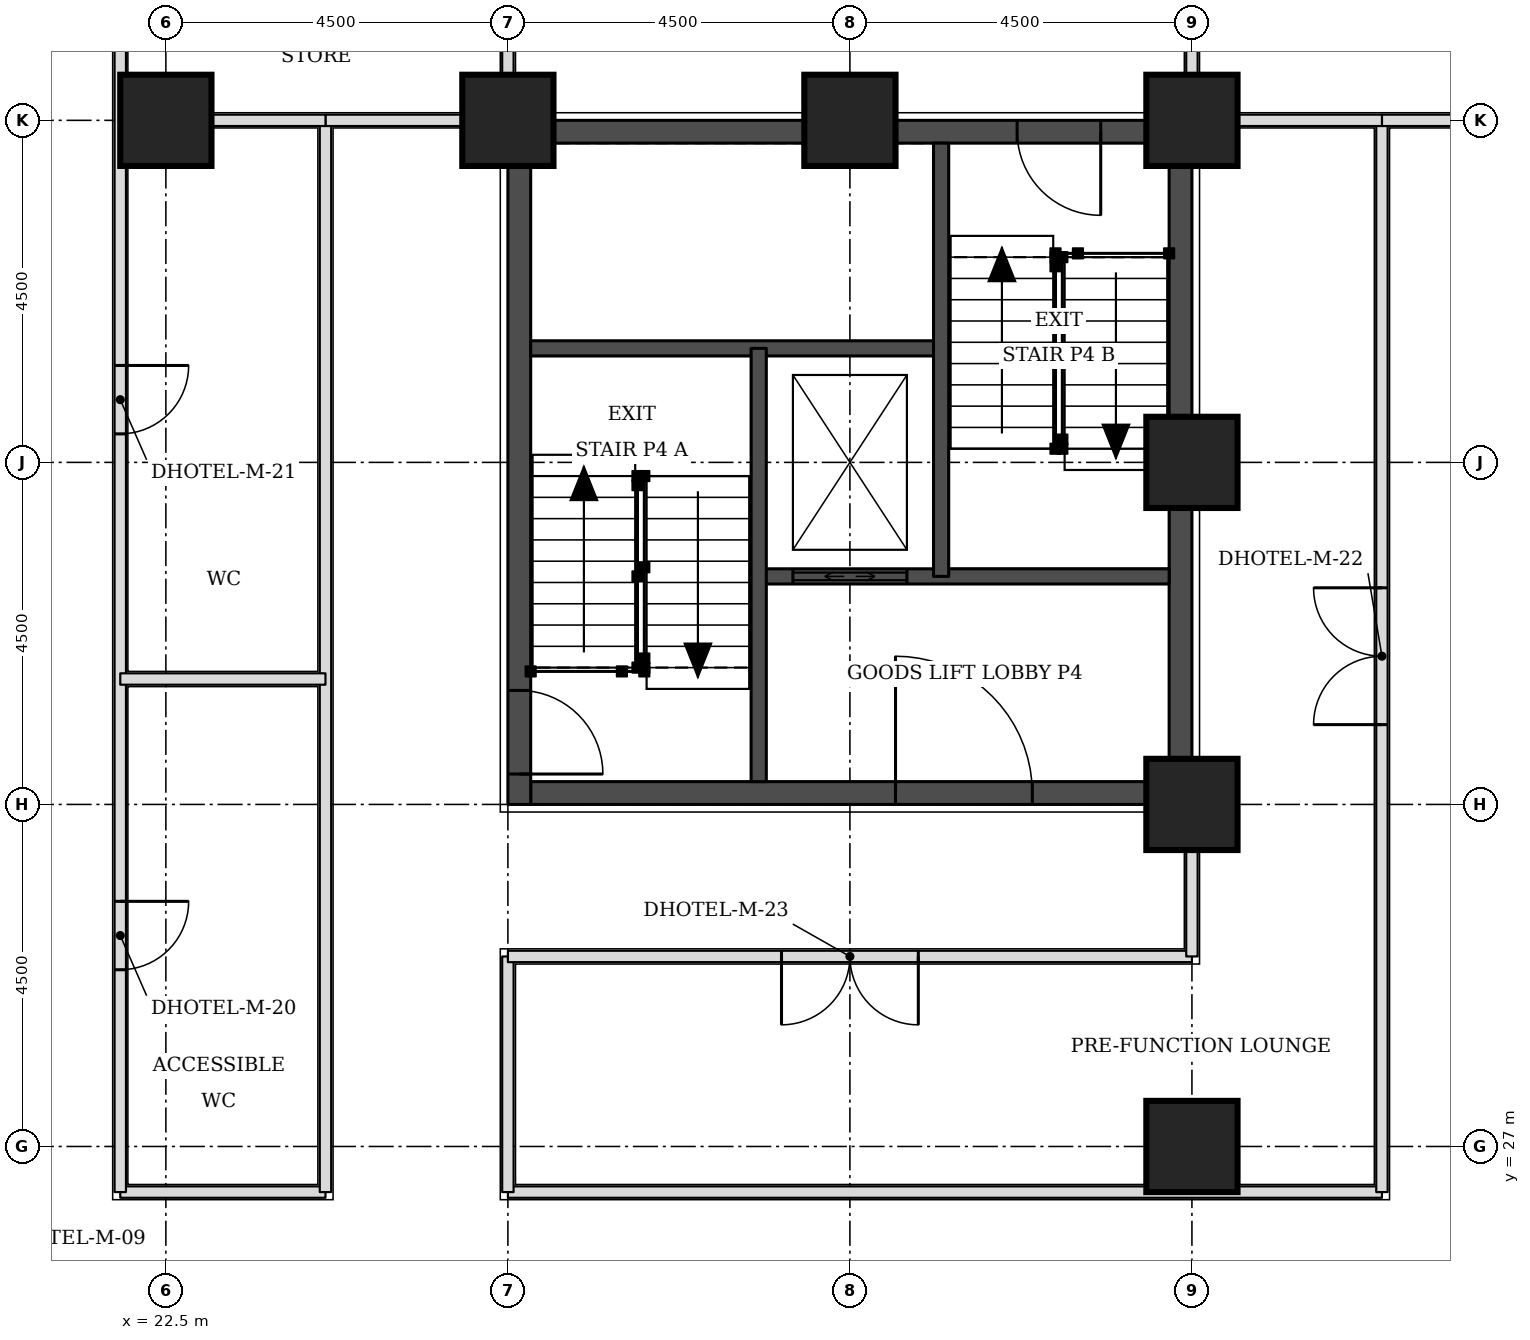
"""IFC4 building model, lengths in metres.
Left out: names, types, materials, properties, quantities, classifications, styles, units other than length and angle.
Written with IfcOpenShell. Run it as: python <this file> out.ifc"""

import sys

from ifc_helpers import new_model, si_unit, direction, frame, frame_2d, origin, origin_2d, place, context, subcontext, project, spatial, rectangle, extrude, element, fill, save


model = new_model("IFC4")
c1 = context("Model", 3, precision=1e-05, world=origin(), true_north=direction((0.0, 1.0)))
c2 = subcontext(c1, "Body", "Model", "MODEL_VIEW")
j1 = project(units=[si_unit("LENGTHUNIT", "METRE"), si_unit("PLANEANGLEUNIT", "RADIAN")], contexts=[c1])
p1 = place(None, origin())
s1 = spatial("IfcSite", under=j1, at=p1, CompositionType="ELEMENT")
p2 = place(p1, origin())
s2 = spatial("IfcBuilding", under=s1, at=p2, CompositionType="ELEMENT")
p3 = place(p2, frame((0.0, 0.0, 23.1)))
s3 = spatial("IfcBuildingStorey", under=s2, at=p3, CompositionType="ELEMENT", Elevation=23.1)
for number, where, z_axis, x_axis in (
    (1, (36.0, 27.0, 0.0), (0.0, 0.0, 1.0), (1.0, 0.0, 0.0)),
    (2, (36.0, 31.5, 0.0), (0.0, 0.0, 1.0), (1.0, 0.0, 0.0)),
    (3, (36.0, 36.0, 0.0), (0.0, 0.0, 1.0), (1.0, 0.0, 0.0)),
    (4, (22.5, 40.5, 0.0), (0.0, 0.0, 1.0), (1.0, 0.0, 0.0)),
    (5, (27.0, 40.5, 0.0), (0.0, 0.0, 1.0), (1.0, 0.0, 0.0)),
    (6, (31.5, 40.5, 0.0), (0.0, 0.0, 1.0), (1.0, 0.0, 0.0)),
    (7, (36.0, 40.5, 0.0), (0.0, 0.0, 1.0), (1.0, 0.0, 0.0)),
):
    element("IfcColumn", number, at=place(p3, frame(where, z_axis=z_axis, x_axis=x_axis)), inside=s3, PredefinedType="COLUMN", context=c2, shape_type="SweptSolid", body=[
        extrude(rectangle(XDim=1.2, YDim=1.2, at=origin_2d()), origin(), (0.0, 0.0, 1.0), 3.3),
    ])
p4 = place(p3, frame((27.3, 31.65, 0.0), z_axis=(0.0, 0.0, 1.0), x_axis=(1.0, 0.0, 0.0)))
e8 = element("IfcWall", 8, at=p4, inside=s3, PredefinedType="SHEAR", context=c2, shape_type="SweptSolid", body=[
    extrude(rectangle(XDim=8.4, YDim=0.3, at=frame_2d((4.2, 0.0))), origin(), (0.0, 0.0, 1.0), 3.3),
])
p5 = place(p4, frame((4.8, 0.0, 0.0)))
e9 = element("IfcOpeningElement", 9, at=p5, cuts=e8, PredefinedType="OPENING", context=c2, shape_type="SweptSolid", body=[
    extrude(rectangle(XDim=1.8, YDim=2.1, at=frame_2d((0.9, 1.05))), frame((0.0, 0.16, 0.0), z_axis=(0.0, -1.0, 0.0), x_axis=(1.0, 0.0, 0.0)), (0.0, 0.0, 1.0), 0.32),
])
p6 = place(p3, frame((27.3, 40.35, 0.0), z_axis=(0.0, 0.0, 1.0), x_axis=(1.0, 0.0, 0.0)))
e10 = element("IfcWall", 10, at=p6, inside=s3, PredefinedType="SHEAR", context=c2, shape_type="SweptSolid", body=[
    extrude(rectangle(XDim=8.4, YDim=0.3, at=frame_2d((4.2, 0.0))), origin(), (0.0, 0.0, 1.0), 3.3),
])
p7 = place(p6, frame((6.4, 0.0, 0.0)))
e11 = element("IfcOpeningElement", 11, at=p7, cuts=e10, PredefinedType="OPENING", context=c2, shape_type="SweptSolid", body=[
    extrude(rectangle(XDim=1.1, YDim=2.1, at=frame_2d((0.55, 1.05))), frame((0.0, 0.16, 0.0), z_axis=(0.0, -1.0, 0.0), x_axis=(1.0, 0.0, 0.0)), (0.0, 0.0, 1.0), 0.32),
])
p8 = place(p3, frame((27.15, 31.5, 0.0), z_axis=(0.0, 0.0, 1.0), x_axis=(0.0, 1.0, 0.0)))
e12 = element("IfcWall", 12, at=p8, inside=s3, PredefinedType="SHEAR", context=c2, shape_type="SweptSolid", body=[
    extrude(rectangle(XDim=9.0, YDim=0.3, at=frame_2d((4.5, 0.0))), origin(), (0.0, 0.0, 1.0), 3.3),
])
p9 = place(p8, frame((0.4, 0.0, 0.0)))
e13 = element("IfcOpeningElement", 13, at=p9, cuts=e12, PredefinedType="OPENING", context=c2, shape_type="SweptSolid", body=[
    extrude(rectangle(XDim=1.1, YDim=2.1, at=frame_2d((0.55, 1.05))), frame((0.0, 0.16, 0.0), z_axis=(0.0, -1.0, 0.0), x_axis=(1.0, 0.0, 0.0)), (0.0, 0.0, 1.0), 0.32),
])
p10 = place(p3, frame((35.85, 31.5, 0.0), z_axis=(0.0, 0.0, 1.0), x_axis=(0.0, 1.0, 0.0)))
e14 = element("IfcWall", 14, at=p10, inside=s3, PredefinedType="SHEAR", context=c2, shape_type="SweptSolid", body=[
    extrude(rectangle(XDim=9.0, YDim=0.3, at=frame_2d((4.5, 0.0))), origin(), (0.0, 0.0, 1.0), 3.3),
])
p11 = place(p3, frame((21.9, 26.4, 0.0), z_axis=(0.0, 0.0, 1.0), x_axis=(1.0, 0.0, 0.0)))
e15 = element("IfcWall", 15, at=p11, inside=s3, PredefinedType="PARTITIONING", context=c2, shape_type="SweptSolid", body=[
    extrude(rectangle(XDim=2.7, YDim=0.15, at=frame_2d((1.35, 0.0))), origin(), (0.0, 0.0, 1.0), 3.08),
])
p12 = place(p3, frame((21.9, 26.4, 0.0), z_axis=(0.0, 0.0, 1.0), x_axis=(0.0, 1.0, 0.0)))
e16 = element("IfcWall", 16, at=p12, inside=s3, PredefinedType="PARTITIONING", context=c2, shape_type="SweptSolid", body=[
    extrude(rectangle(XDim=16.6, YDim=0.15, at=frame_2d((8.3, 0.0))), origin(), (0.0, 0.0, 1.0), 3.08),
])
p13 = place(p12, frame((2.925, 0.0, 0.0)))
e17 = element("IfcOpeningElement", 17, at=p13, cuts=e16, PredefinedType="OPENING", context=c2, shape_type="SweptSolid", body=[
    extrude(rectangle(XDim=0.9, YDim=2.1, at=frame_2d((0.45, 1.05))), frame((0.0, 0.085, 0.0), z_axis=(0.0, -1.0, 0.0), x_axis=(1.0, 0.0, 0.0)), (0.0, 0.0, 1.0), 0.17),
])
p14 = place(p12, frame((9.975, 0.0, 0.0)))
e18 = element("IfcOpeningElement", 18, at=p14, cuts=e16, PredefinedType="OPENING", context=c2, shape_type="SweptSolid", body=[
    extrude(rectangle(XDim=0.9, YDim=2.1, at=frame_2d((0.45, 1.05))), frame((0.0, 0.085, 0.0), z_axis=(0.0, -1.0, 0.0), x_axis=(1.0, 0.0, 0.0)), (0.0, 0.0, 1.0), 0.17),
])
p15 = place(p3, frame((24.6, 26.4, 0.0), z_axis=(0.0, 0.0, 1.0), x_axis=(0.0, 1.0, 0.0)))
e19 = element("IfcWall", 19, at=p15, inside=s3, PredefinedType="PARTITIONING", context=c2, shape_type="SweptSolid", body=[
    extrude(rectangle(XDim=14.1, YDim=0.15, at=frame_2d((7.05, 0.0))), origin(), (0.0, 0.0, 1.0), 3.08),
])
p16 = place(p3, frame((27.0, 26.4, 0.0), z_axis=(0.0, 0.0, 1.0), x_axis=(1.0, 0.0, 0.0)))
e20 = element("IfcWall", 20, at=p16, inside=s3, PredefinedType="PARTITIONING", context=c2, shape_type="SweptSolid", body=[
    extrude(rectangle(XDim=11.5, YDim=0.15, at=frame_2d((5.75, 0.0))), origin(), (0.0, 0.0, 1.0), 3.08),
])
p17 = place(p3, frame((27.0, 26.4, 0.0), z_axis=(0.0, 0.0, 1.0), x_axis=(0.0, 1.0, 0.0)))
e21 = element("IfcWall", 21, at=p17, inside=s3, PredefinedType="PARTITIONING", context=c2, shape_type="SweptSolid", body=[
    extrude(rectangle(XDim=3.1, YDim=0.15, at=frame_2d((1.55, 0.0))), origin(), (0.0, 0.0, 1.0), 3.08),
])
p18 = place(p3, frame((38.5, 26.4, 0.0), z_axis=(0.0, 0.0, 1.0), x_axis=(0.0, 1.0, 0.0)))
e22 = element("IfcWall", 22, at=p18, inside=s3, PredefinedType="PARTITIONING", context=c2, shape_type="SweptSolid", body=[
    extrude(rectangle(XDim=14.1, YDim=0.15, at=frame_2d((7.05, 0.0))), origin(), (0.0, 0.0, 1.0), 3.08),
])
p19 = place(p18, frame((6.15, 0.0, 0.0)))
e23 = element("IfcOpeningElement", 23, at=p19, cuts=e22, PredefinedType="OPENING", context=c2, shape_type="SweptSolid", body=[
    extrude(rectangle(XDim=1.8, YDim=2.1, at=frame_2d((0.9, 1.05))), frame((0.0, 0.085, 0.0), z_axis=(0.0, -1.0, 0.0), x_axis=(1.0, 0.0, 0.0)), (0.0, 0.0, 1.0), 0.17),
])
p20 = place(p3, frame((27.0, 29.5, 0.0), z_axis=(0.0, 0.0, 1.0), x_axis=(1.0, 0.0, 0.0)))
e24 = element("IfcWall", 24, at=p20, inside=s3, PredefinedType="PARTITIONING", context=c2, shape_type="SweptSolid", body=[
    extrude(rectangle(XDim=9.0, YDim=0.15, at=frame_2d((4.5, 0.0))), origin(), (0.0, 0.0, 1.0), 3.08),
])
p21 = place(p20, frame((3.6, 0.0, 0.0)))
e25 = element("IfcOpeningElement", 25, at=p21, cuts=e24, PredefinedType="OPENING", context=c2, shape_type="SweptSolid", body=[
    extrude(rectangle(XDim=1.8, YDim=2.1, at=frame_2d((0.9, 1.05))), frame((0.0, 0.085, 0.0), z_axis=(0.0, -1.0, 0.0), x_axis=(1.0, 0.0, 0.0)), (0.0, 0.0, 1.0), 0.17),
])
p22 = place(p3, frame((36.0, 29.5, 0.0), z_axis=(0.0, 0.0, 1.0), x_axis=(0.0, 1.0, 0.0)))
e26 = element("IfcWall", 26, at=p22, inside=s3, PredefinedType="PARTITIONING", context=c2, shape_type="SweptSolid", body=[
    extrude(rectangle(XDim=1.95, YDim=0.15, at=frame_2d((0.975, 0.0))), origin(), (0.0, 0.0, 1.0), 2.33),
])
p23 = place(p3, frame((24.6, 40.5, 0.0), z_axis=(0.0, 0.0, 1.0), x_axis=(1.0, 0.0, 0.0)))
e27 = element("IfcWall", 27, at=p23, inside=s3, PredefinedType="PARTITIONING", context=c2, shape_type="SweptSolid", body=[
    extrude(rectangle(XDim=2.35, YDim=0.15, at=frame_2d((1.175, 0.0))), origin(), (0.0, 0.0, 1.0), 2.33),
])
p24 = place(p3, frame((38.5, 40.5, 0.0), z_axis=(0.0, 0.0, 1.0), x_axis=(1.0, 0.0, 0.0)))
e28 = element("IfcWall", 28, at=p24, inside=s3, PredefinedType="PARTITIONING", context=c2, shape_type="SweptSolid", body=[
    extrude(rectangle(XDim=1.95, YDim=0.15, at=frame_2d((0.975, 0.0))), origin(), (0.0, 0.0, 1.0), 2.33),
])
p25 = place(p3, frame((27.0, 40.55, 0.0), z_axis=(0.0, 0.0, 1.0), x_axis=(0.0, 1.0, 0.0)))
e29 = element("IfcWall", 29, at=p25, inside=s3, PredefinedType="PARTITIONING", context=c2, shape_type="SweptSolid", body=[
    extrude(rectangle(XDim=2.45, YDim=0.15, at=frame_2d((1.225, 0.0))), origin(), (0.0, 0.0, 1.0), 3.08),
])
p26 = place(p3, frame((36.0, 40.55, 0.0), z_axis=(0.0, 0.0, 1.0), x_axis=(0.0, 1.0, 0.0)))
e30 = element("IfcWall", 30, at=p26, inside=s3, PredefinedType="PARTITIONING", context=c2, shape_type="SweptSolid", body=[
    extrude(rectangle(XDim=4.4, YDim=0.15, at=frame_2d((2.2, 0.0))), origin(), (0.0, 0.0, 1.0), 2.33),
])
p27 = place(p26, frame((1.302, 0.0, 0.0)))
e31 = element("IfcOpeningElement", 31, at=p27, cuts=e30, PredefinedType="OPENING", context=c2, shape_type="SweptSolid", body=[
    extrude(rectangle(XDim=1.8, YDim=2.1, at=frame_2d((0.9, 1.05))), frame((0.0, 0.085, 0.0), z_axis=(0.0, -1.0, 0.0), x_axis=(1.0, 0.0, 0.0)), (0.0, 0.0, 1.0), 0.17),
])
p28 = place(p3, frame((21.9, 33.15, 0.0), z_axis=(0.0, 0.0, 1.0), x_axis=(1.0, 0.0, 0.0)))
e32 = element("IfcWall", 32, at=p28, inside=s3, PredefinedType="PARTITIONING", context=c2, shape_type="SweptSolid", body=[
    extrude(rectangle(XDim=2.7, YDim=0.15, at=frame_2d((1.35, 0.0))), origin(), (0.0, 0.0, 1.0), 3.08),
])
p29 = place(p3, frame((21.9, 40.5, 0.0), z_axis=(0.0, 0.0, 1.0), x_axis=(1.0, 0.0, 0.0)))
e33 = element("IfcWall", 33, at=p29, inside=s3, PredefinedType="PARTITIONING", context=c2, shape_type="SweptSolid", body=[
    extrude(rectangle(XDim=2.7, YDim=0.15, at=frame_2d((1.35, 0.0))), origin(), (0.0, 0.0, 1.0), 2.33),
])
p30 = place(p3, frame((36.05, 40.5, 0.0), z_axis=(0.0, 0.0, 1.0), x_axis=(1.0, 0.0, 0.0)))
e34 = element("IfcWall", 34, at=p30, inside=s3, PredefinedType="PARTITIONING", context=c2, shape_type="SweptSolid", body=[
    extrude(rectangle(XDim=2.45, YDim=0.15, at=frame_2d((1.225, 0.0))), origin(), (0.0, 0.0, 1.0), 2.33),
])
p31 = place(p3, frame((30.3, 34.5, 0.0), z_axis=(0.0, 0.0, 1.0), x_axis=(1.0, 0.0, 0.0)))
e35 = element("IfcWall", 35, at=p31, inside=s3, PredefinedType="SOLIDWALL", context=c2, shape_type="SweptSolid", body=[
    extrude(rectangle(XDim=5.4, YDim=0.2, at=frame_2d((2.7, 0.0))), origin(), (0.0, 0.0, 1.0), 3.08),
])
p32 = place(p31, frame((0.45, 0.0, 0.0)))
e36 = element("IfcOpeningElement", 36, at=p32, cuts=e35, PredefinedType="OPENING", context=c2, shape_type="SweptSolid", body=[
    extrude(rectangle(XDim=1.5, YDim=2.1, at=frame_2d((0.75, 1.05))), frame((0.0, 0.11, 0.0), z_axis=(0.0, -1.0, 0.0), x_axis=(1.0, 0.0, 0.0)), (0.0, 0.0, 1.0), 0.22),
])
p33 = place(p3, frame((27.3, 37.5, 0.0), z_axis=(0.0, 0.0, 1.0), x_axis=(1.0, 0.0, 0.0)))
e37 = element("IfcWall", 37, at=p33, inside=s3, PredefinedType="SOLIDWALL", context=c2, shape_type="SweptSolid", body=[
    extrude(rectangle(XDim=5.4, YDim=0.2, at=frame_2d((2.7, 0.0))), origin(), (0.0, 0.0, 1.0), 3.08),
])
for number, where, z_axis, x_axis in (
    (38, (30.3, 31.8, 0.0), (0.0, 0.0, 1.0), (0.0, 1.0, 0.0)),
    (39, (32.7, 34.5, 0.0), (0.0, 0.0, 1.0), (0.0, 1.0, 0.0)),
):
    element("IfcWall", number, at=place(p3, frame(where, z_axis=z_axis, x_axis=x_axis)), inside=s3, PredefinedType="SOLIDWALL", context=c2, shape_type="SweptSolid", body=[
        extrude(rectangle(XDim=5.7, YDim=0.2, at=frame_2d((2.85, 0.0))), origin(), (0.0, 0.0, 1.0), 3.08),
    ])
p34 = place(p13, frame((0.9, 0.0, 0.0), z_axis=(0.0, 0.0, 1.0), x_axis=(-1.0, 0.0, 0.0)))
e40 = element("IfcDoor", 40, at=p34, inside=s3, OperationType="SINGLE_SWING_LEFT", PredefinedType="DOOR", context=c2, shape_type="SweptSolid", body=[
    extrude(rectangle(XDim=0.9, YDim=2.1, at=frame_2d((0.45, 1.05))), frame((0.0, 0.025, 0.0), z_axis=(0.0, -1.0, 0.0), x_axis=(1.0, 0.0, 0.0)), (0.0, 0.0, 1.0), 0.05),
])
fill(e17, e40)
p35 = place(p14, frame((0.9, 0.0, 0.0), z_axis=(0.0, 0.0, 1.0), x_axis=(-1.0, 0.0, 0.0)))
e41 = element("IfcDoor", 41, at=p35, inside=s3, OperationType="SINGLE_SWING_LEFT", PredefinedType="DOOR", context=c2, shape_type="SweptSolid", body=[
    extrude(rectangle(XDim=0.9, YDim=2.1, at=frame_2d((0.45, 1.05))), frame((0.0, 0.025, 0.0), z_axis=(0.0, -1.0, 0.0), x_axis=(1.0, 0.0, 0.0)), (0.0, 0.0, 1.0), 0.05),
])
fill(e18, e41)
p36 = place(p19, origin())
e42 = element("IfcDoor", 42, at=p36, inside=s3, OperationType="DOUBLE_DOOR_SINGLE_SWING", PredefinedType="DOOR", context=c2, shape_type="SweptSolid", body=[
    extrude(rectangle(XDim=1.8, YDim=2.1, at=frame_2d((0.9, 1.05))), frame((0.0, 0.025, 0.0), z_axis=(0.0, -1.0, 0.0), x_axis=(1.0, 0.0, 0.0)), (0.0, 0.0, 1.0), 0.05),
])
fill(e23, e42)
p37 = place(p21, frame((1.8, 0.0, 0.0), z_axis=(0.0, 0.0, 1.0), x_axis=(-1.0, 0.0, 0.0)))
e43 = element("IfcDoor", 43, at=p37, inside=s3, OperationType="DOUBLE_DOOR_SINGLE_SWING", PredefinedType="DOOR", context=c2, shape_type="SweptSolid", body=[
    extrude(rectangle(XDim=1.8, YDim=2.1, at=frame_2d((0.9, 1.05))), frame((0.0, 0.025, 0.0), z_axis=(0.0, -1.0, 0.0), x_axis=(1.0, 0.0, 0.0)), (0.0, 0.0, 1.0), 0.05),
])
fill(e25, e43)
p38 = place(p9, frame((1.1, 0.0, 0.0), z_axis=(0.0, 0.0, 1.0), x_axis=(-1.0, 0.0, 0.0)))
e44 = element("IfcDoor", 44, at=p38, inside=s3, OperationType="SINGLE_SWING_RIGHT", PredefinedType="DOOR", context=c2, shape_type="SweptSolid", body=[
    extrude(rectangle(XDim=1.1, YDim=2.1, at=frame_2d((0.55, 1.05))), frame((0.0, 0.025, 0.0), z_axis=(0.0, -1.0, 0.0), x_axis=(1.0, 0.0, 0.0)), (0.0, 0.0, 1.0), 0.05),
])
fill(e13, e44)
p39 = place(p7, frame((1.1, 0.0, 0.0), z_axis=(0.0, 0.0, 1.0), x_axis=(-1.0, 0.0, 0.0)))
e45 = element("IfcDoor", 45, at=p39, inside=s3, OperationType="SINGLE_SWING_LEFT", PredefinedType="DOOR", context=c2, shape_type="SweptSolid", body=[
    extrude(rectangle(XDim=1.1, YDim=2.1, at=frame_2d((0.55, 1.05))), frame((0.0, 0.025, 0.0), z_axis=(0.0, -1.0, 0.0), x_axis=(1.0, 0.0, 0.0)), (0.0, 0.0, 1.0), 0.05),
])
fill(e11, e45)
p40 = place(p32, origin())
e46 = element("IfcDoor", 46, at=p40, inside=s3, OperationType="DOUBLE_DOOR_SLIDING", PredefinedType="DOOR", context=c2, shape_type="SweptSolid", body=[
    extrude(rectangle(XDim=1.5, YDim=2.1, at=frame_2d((0.75, 1.05))), frame((0.0, 0.025, 0.0), z_axis=(0.0, -1.0, 0.0), x_axis=(1.0, 0.0, 0.0)), (0.0, 0.0, 1.0), 0.05),
])
fill(e36, e46)
p41 = place(p5, origin())
e47 = element("IfcDoor", 47, at=p41, inside=s3, OperationType="SINGLE_SWING_LEFT", PredefinedType="DOOR", context=c2, shape_type="SweptSolid", body=[
    extrude(rectangle(XDim=1.8, YDim=2.1, at=frame_2d((0.9, 1.05))), frame((0.0, 0.025, 0.0), z_axis=(0.0, -1.0, 0.0), x_axis=(1.0, 0.0, 0.0)), (0.0, 0.0, 1.0), 0.05),
])
fill(e9, e47)
save(model, sys.argv[1])
